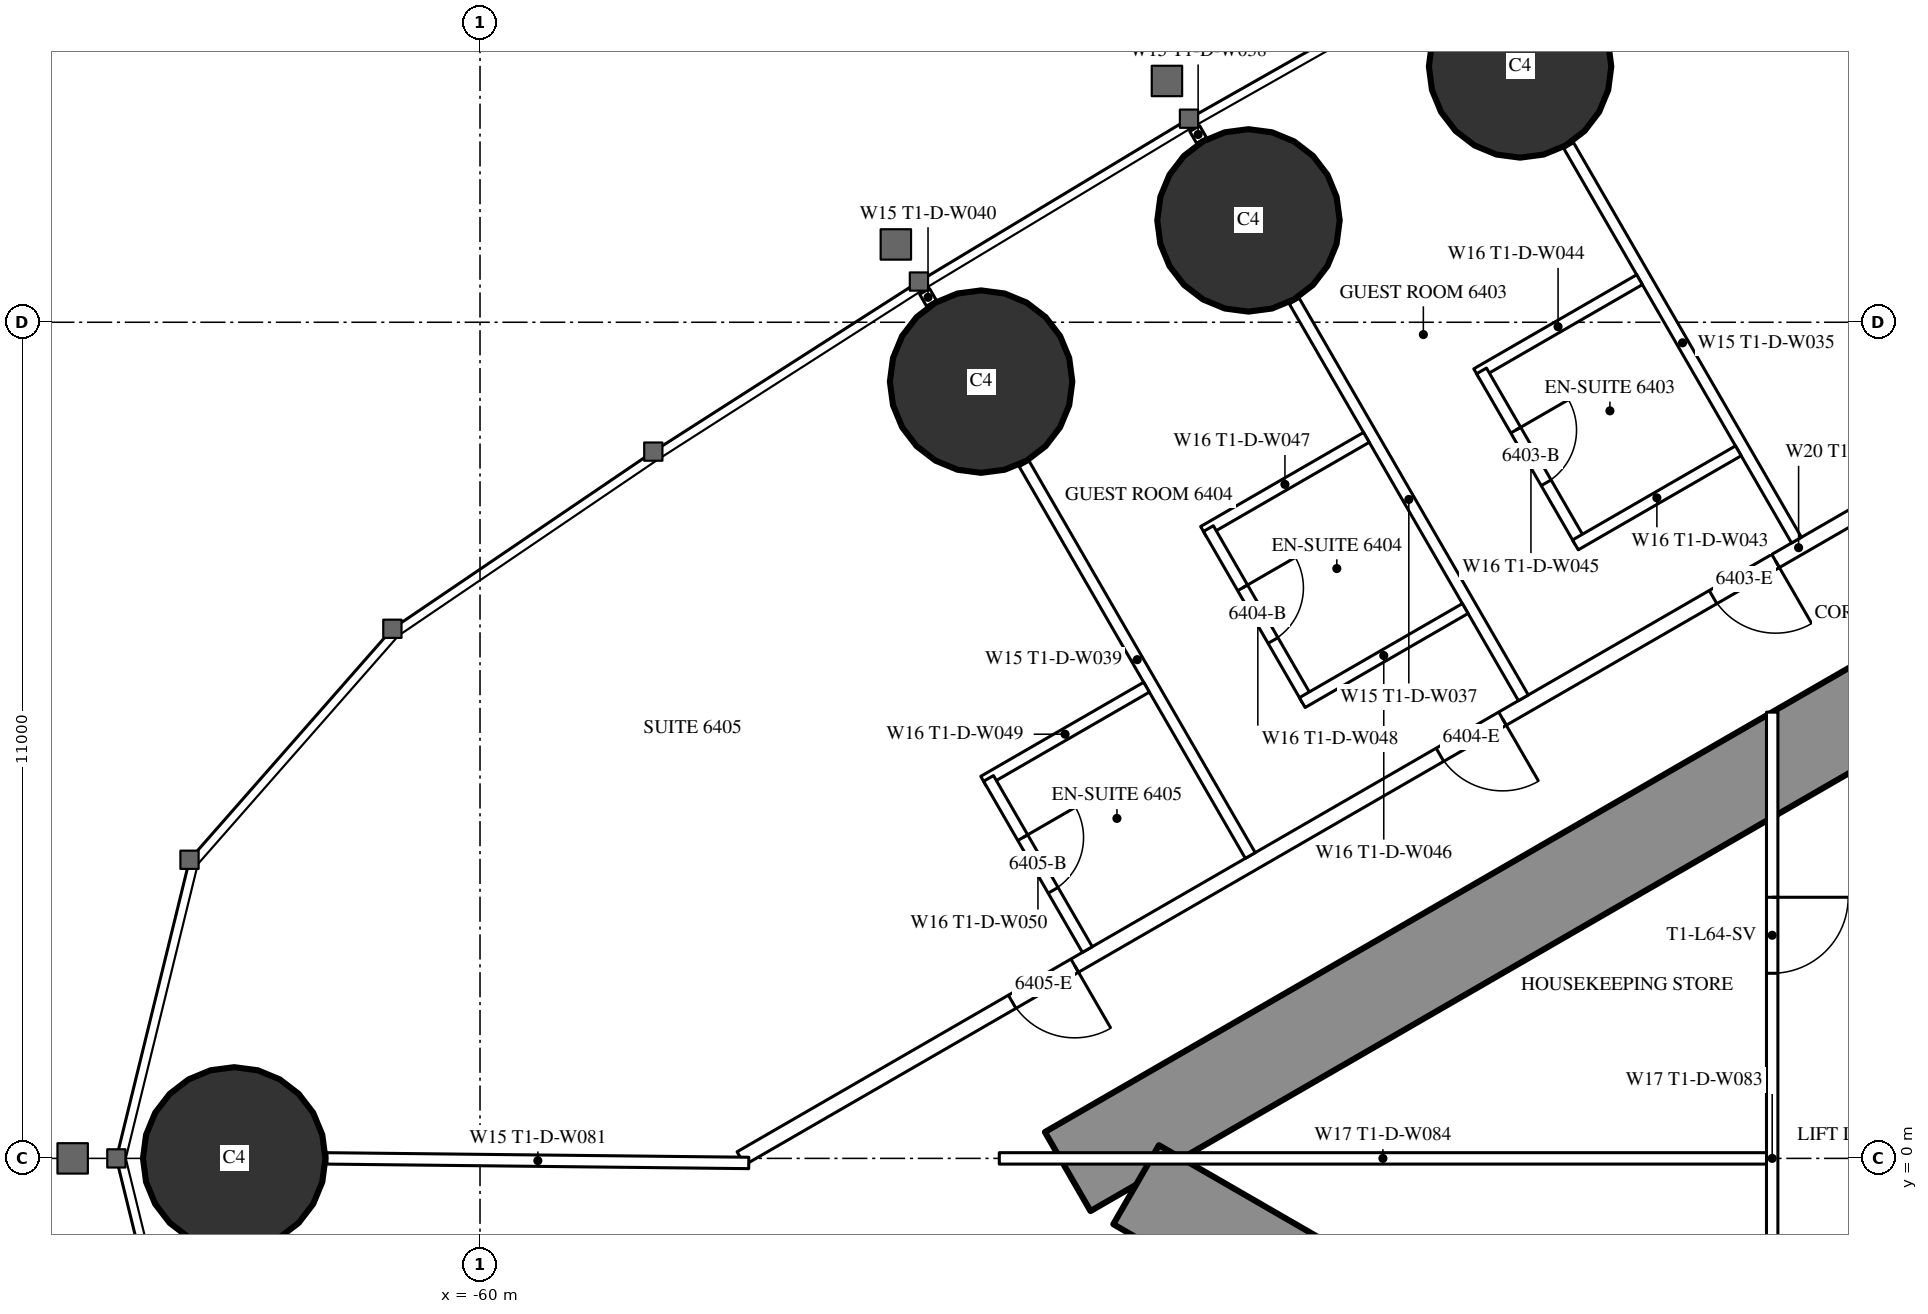
"""IFC4 building model, lengths in metres.
Left out: names, types, materials, properties, quantities, classifications, styles, units other than length and angle.
Written with IfcOpenShell. Run it as: python <this file> out.ifc"""

import sys

from ifc_helpers import new_model, si_unit, direction, frame, frame_2d, origin, origin_2d, place, context, subcontext, project, spatial, rectangle, circle, extrude, element, fill, save


model = new_model("IFC4")
c1 = context("Model", 3, precision=1e-05, world=origin(), true_north=direction((0.0, 1.0)))
c2 = subcontext(c1, "Body", "Model", "MODEL_VIEW")
j1 = project(units=[si_unit("LENGTHUNIT", "METRE"), si_unit("PLANEANGLEUNIT", "RADIAN")], contexts=[c1])
p1 = place(None, origin())
s1 = spatial("IfcSite", under=j1, at=p1, CompositionType="ELEMENT")
p2 = place(p1, origin())
s2 = spatial("IfcBuilding", under=s1, at=p2, CompositionType="ELEMENT")
p3 = place(p2, frame((0.0, 0.0, 240.5)))
s3 = spatial("IfcBuildingStorey", under=s2, at=p3, CompositionType="ELEMENT", Elevation=240.5)
for number, where, z_axis, x_axis in (
    (1, (-63.234, 0.0, 0.0), (0.0, 0.0, 1.0), (1.0, 0.0, 0.0)),
    (2, (-46.317, 14.365, 0.0), (0.0, 0.0, 1.0), (1.0, 0.0, 0.0)),
    (3, (-49.89, 12.34, 0.0), (0.0, 0.0, 1.0), (1.0, 0.0, 0.0)),
    (4, (-53.408, 10.219, 0.0), (0.0, 0.0, 1.0), (1.0, 0.0, 0.0)),
):
    element("IfcColumn", number, at=place(p3, frame(where, z_axis=z_axis, x_axis=x_axis)), inside=s3, PredefinedType="COLUMN", context=c2, shape_type="SweptSolid", body=[
        extrude(circle(Radius=1.2, at=origin_2d()), origin(), (0.0, 0.0, 1.0), 3.6),
    ])
p4 = place(p3, frame((-27.2, 14.3, 0.0), z_axis=(0.0, 0.0, 1.0), x_axis=(-0.866026593062, -0.499997940104, 0.0)))
e5 = element("IfcWall", 5, at=p4, inside=s3, PredefinedType="SHEAR", context=c2, shape_type="SweptSolid", body=[
    extrude(rectangle(XDim=28.946, YDim=1.2, at=frame_2d((14.473, 0.0))), origin(), (0.0, 0.0, 1.0), 3.6),
])
p5 = place(p4, frame((4.6, 0.0, 0.0)))
e6 = element("IfcOpeningElement", 6, at=p5, cuts=e5, PredefinedType="OPENING", context=c2, shape_type="SweptSolid", body=[
    extrude(rectangle(XDim=1.0, YDim=2.2, at=frame_2d((0.5, 1.1))), frame((0.0, 0.61, 0.0), z_axis=(0.0, -1.0, 0.0), x_axis=(1.0, 0.0, 0.0)), (0.0, 0.0, 1.0), 1.22),
])
p6 = place(p4, frame((13.395, 0.0, 0.0)))
e7 = element("IfcOpeningElement", 7, at=p6, cuts=e5, PredefinedType="OPENING", context=c2, shape_type="SweptSolid", body=[
    extrude(rectangle(XDim=1.8, YDim=2.2, at=frame_2d((0.9, 1.1))), frame((0.0, 0.61, 0.0), z_axis=(0.0, -1.0, 0.0), x_axis=(1.0, 0.0, 0.0)), (0.0, 0.0, 1.0), 1.22),
])
p7 = place(p3, frame((-27.2, -14.3, 0.0), z_axis=(0.0, 0.0, 1.0), x_axis=(-0.866024021859, 0.500002393557, 0.0)))
e8 = element("IfcWall", 8, at=p7, inside=s3, PredefinedType="SHEAR", context=c2, shape_type="SweptSolid", body=[
    extrude(rectangle(XDim=27.907, YDim=1.2, at=frame_2d((13.954, 0.0))), origin(), (0.0, 0.0, 1.0), 3.6),
])
p8 = place(p7, frame((4.6, 0.0, 0.0)))
e9 = element("IfcOpeningElement", 9, at=p8, cuts=e8, PredefinedType="OPENING", context=c2, shape_type="SweptSolid", body=[
    extrude(rectangle(XDim=1.0, YDim=2.2, at=frame_2d((0.5, 1.1))), frame((0.0, 0.61, 0.0), z_axis=(0.0, -1.0, 0.0), x_axis=(1.0, 0.0, 0.0)), (0.0, 0.0, 1.0), 1.22),
])
p9 = place(p7, frame((13.395, 0.0, 0.0)))
e10 = element("IfcOpeningElement", 10, at=p9, cuts=e8, PredefinedType="OPENING", context=c2, shape_type="SweptSolid", body=[
    extrude(rectangle(XDim=1.8, YDim=2.2, at=frame_2d((0.9, 1.1))), frame((0.0, 0.61, 0.0), z_axis=(0.0, -1.0, 0.0), x_axis=(1.0, 0.0, 0.0)), (0.0, 0.0, 1.0), 1.22),
])
p10 = place(p3, frame((-28.737, 16.068, 0.0), z_axis=(0.0, 0.0, 1.0), x_axis=(-0.866026057212, -0.499998868229, 0.0)))
e11 = element("IfcWall", 11, at=p10, inside=s3, PredefinedType="PARTITIONING", context=c2, shape_type="SweptSolid", body=[
    extrude(rectangle(XDim=32.137, YDim=0.2, at=frame_2d((16.068, 0.0))), origin(), (0.0, 0.0, 1.0), 3.35),
])
p11 = place(p10, frame((1.08, 0.0, 0.0)))
e12 = element("IfcOpeningElement", 12, at=p11, cuts=e11, PredefinedType="OPENING", context=c2, shape_type="SweptSolid", body=[
    extrude(rectangle(XDim=1.8, YDim=2.03, at=frame_2d((0.9, 1.015))), frame((0.0, 0.11, 0.0), z_axis=(0.0, -1.0, 0.0), x_axis=(1.0, 0.0, 0.0)), (0.0, 0.0, 1.0), 0.22),
])
p12 = place(p10, frame((6.86, 0.0, 0.0)))
e13 = element("IfcOpeningElement", 13, at=p12, cuts=e11, PredefinedType="OPENING", context=c2, shape_type="SweptSolid", body=[
    extrude(rectangle(XDim=1.0, YDim=2.2, at=frame_2d((0.5, 1.1))), frame((0.0, 0.11, 0.0), z_axis=(0.0, -1.0, 0.0), x_axis=(1.0, 0.0, 0.0)), (0.0, 0.0, 1.0), 0.22),
])
p13 = place(p10, frame((16.418, 0.0, 0.0)))
e14 = element("IfcOpeningElement", 14, at=p13, cuts=e11, PredefinedType="OPENING", context=c2, shape_type="SweptSolid", body=[
    extrude(rectangle(XDim=0.95, YDim=2.2, at=frame_2d((0.475, 1.1))), frame((0.0, 0.11, 0.0), z_axis=(0.0, -1.0, 0.0), x_axis=(1.0, 0.0, 0.0)), (0.0, 0.0, 1.0), 0.22),
])
p14 = place(p10, frame((20.567, 0.0, 0.0)))
e15 = element("IfcOpeningElement", 15, at=p14, cuts=e11, PredefinedType="OPENING", context=c2, shape_type="SweptSolid", body=[
    extrude(rectangle(XDim=0.95, YDim=2.2, at=frame_2d((0.475, 1.1))), frame((0.0, 0.11, 0.0), z_axis=(0.0, -1.0, 0.0), x_axis=(1.0, 0.0, 0.0)), (0.0, 0.0, 1.0), 0.22),
])
p15 = place(p10, frame((27.065, 0.0, 0.0)))
e16 = element("IfcOpeningElement", 16, at=p15, cuts=e11, PredefinedType="OPENING", context=c2, shape_type="SweptSolid", body=[
    extrude(rectangle(XDim=0.95, YDim=2.2, at=frame_2d((0.475, 1.1))), frame((0.0, 0.11, 0.0), z_axis=(0.0, -1.0, 0.0), x_axis=(1.0, 0.0, 0.0)), (0.0, 0.0, 1.0), 0.22),
])
p16 = place(p3, frame((-42.68, 8.134, 0.0), z_axis=(0.0, 0.0, 1.0), x_axis=(-0.499984479505, 0.866034364361, 0.0)))
e17 = element("IfcWall", 17, at=p16, inside=s3, PredefinedType="PARTITIONING", context=c2, shape_type="SweptSolid", body=[
    extrude(rectangle(XDim=5.995, YDim=0.15, at=frame_2d((2.998, 0.0))), origin(), (0.0, 0.0, 1.0), 2.45),
])
p17 = place(p3, frame((-46.274, 6.059, 0.0), z_axis=(0.0, 0.0, 1.0), x_axis=(-0.500020471368, 0.866013584312, 0.0)))
e18 = element("IfcWall", 18, at=p17, inside=s3, PredefinedType="PARTITIONING", context=c2, shape_type="SweptSolid", body=[
    extrude(rectangle(XDim=6.028, YDim=0.15, at=frame_2d((3.014, 0.0))), origin(), (0.0, 0.0, 1.0), 2.45),
])
p18 = place(p3, frame((-50.508, 13.392, 0.0), z_axis=(0.0, 0.0, 1.0), x_axis=(-0.499644091975, 0.866230789891, 0.0)))
e19 = element("IfcWall", 19, at=p18, inside=s3, PredefinedType="PARTITIONING", context=c2, shape_type="SweptSolid", body=[
    extrude(rectangle(XDim=0.18, YDim=0.15, at=frame_2d((0.09, 0.0))), origin(), (0.0, 0.0, 1.0), 2.45),
])
p19 = place(p3, frame((-49.866, 3.985, 0.0), z_axis=(0.0, 0.0, 1.0), x_axis=(-0.500000694566, 0.866025002776, 0.0)))
e20 = element("IfcWall", 20, at=p19, inside=s3, PredefinedType="PARTITIONING", context=c2, shape_type="SweptSolid", body=[
    extrude(rectangle(XDim=5.95, YDim=0.15, at=frame_2d((2.975, 0.0))), origin(), (0.0, 0.0, 1.0), 2.45),
])
p20 = place(p3, frame((-54.061, 11.25, 0.0), z_axis=(0.0, 0.0, 1.0), x_axis=(-0.500391173478, 0.865799441849, 0.0)))
e21 = element("IfcWall", 21, at=p20, inside=s3, PredefinedType="PARTITIONING", context=c2, shape_type="SweptSolid", body=[
    extrude(rectangle(XDim=0.179, YDim=0.15, at=frame_2d((0.089, 0.0))), origin(), (0.0, 0.0, 1.0), 2.45),
])
p21 = place(p3, frame((-56.464, -0.06, 0.0), z_axis=(0.0, 0.0, 1.0), x_axis=(-0.999941455167, 0.01082063951, 0.0)))
e22 = element("IfcWall", 22, at=p21, inside=s3, PredefinedType="PARTITIONING", context=c2, shape_type="SweptSolid", body=[
    extrude(rectangle(XDim=5.55, YDim=0.15, at=frame_2d((2.775, 0.0))), origin(), (0.0, 0.0, 1.0), 2.45),
])
p22 = place(p3, frame((-44.745, 11.56, 0.0), z_axis=(0.0, 0.0, 1.0), x_axis=(-0.866006523861, -0.500032699561, 0.0)))
e23 = element("IfcWall", 23, at=p22, inside=s3, PredefinedType="PARTITIONING", context=c2, shape_type="SweptSolid", body=[
    extrude(rectangle(XDim=2.475, YDim=0.15, at=frame_2d((1.237, 0.0))), origin(), (0.0, 0.0, 1.0), 3.35),
])
p23 = place(p3, frame((-45.524, 8.109, 0.0), z_axis=(0.0, 0.0, 1.0), x_axis=(-0.49997716683, 0.86603858612, 0.0)))
e24 = element("IfcWall", 24, at=p23, inside=s3, PredefinedType="PARTITIONING", context=c2, shape_type="SweptSolid", body=[
    extrude(rectangle(XDim=2.6, YDim=0.15, at=frame_2d((1.3, 0.0))), origin(), (0.0, 0.0, 1.0), 3.35),
])
p24 = place(p23, frame((0.9, 0.0, 0.0)))
e25 = element("IfcOpeningElement", 25, at=p24, cuts=e24, PredefinedType="OPENING", context=c2, shape_type="SweptSolid", body=[
    extrude(rectangle(XDim=0.8, YDim=2.2, at=frame_2d((0.4, 1.1))), frame((0.0, 0.085, 0.0), z_axis=(0.0, -1.0, 0.0), x_axis=(1.0, 0.0, 0.0)), (0.0, 0.0, 1.0), 0.17),
])
p25 = place(p3, frame((-43.445, 9.309, 0.0), z_axis=(0.0, 0.0, 1.0), x_axis=(-0.866031185235, -0.4999899861, 0.0)))
e26 = element("IfcWall", 26, at=p25, inside=s3, PredefinedType="PARTITIONING", context=c2, shape_type="SweptSolid", body=[
    extrude(rectangle(XDim=2.475, YDim=0.15, at=frame_2d((1.238, 0.0))), origin(), (0.0, 0.0, 1.0), 3.35),
])
p26 = place(p3, frame((-48.339, 9.486, 0.0), z_axis=(0.0, 0.0, 1.0), x_axis=(-0.866006523861, -0.500032699561, 0.0)))
e27 = element("IfcWall", 27, at=p26, inside=s3, PredefinedType="PARTITIONING", context=c2, shape_type="SweptSolid", body=[
    extrude(rectangle(XDim=2.475, YDim=0.15, at=frame_2d((1.237, 0.0))), origin(), (0.0, 0.0, 1.0), 3.35),
])
p27 = place(p3, frame((-49.117, 6.034, 0.0), z_axis=(0.0, 0.0, 1.0), x_axis=(-0.500006934395, 0.866021400173, 0.0)))
e28 = element("IfcWall", 28, at=p27, inside=s3, PredefinedType="PARTITIONING", context=c2, shape_type="SweptSolid", body=[
    extrude(rectangle(XDim=2.6, YDim=0.15, at=frame_2d((1.3, 0.0))), origin(), (0.0, 0.0, 1.0), 3.35),
])
p28 = place(p27, frame((0.9, 0.0, 0.0)))
e29 = element("IfcOpeningElement", 29, at=p28, cuts=e28, PredefinedType="OPENING", context=c2, shape_type="SweptSolid", body=[
    extrude(rectangle(XDim=0.8, YDim=2.2, at=frame_2d((0.4, 1.1))), frame((0.0, 0.085, 0.0), z_axis=(0.0, -1.0, 0.0), x_axis=(1.0, 0.0, 0.0)), (0.0, 0.0, 1.0), 0.17),
])
for number, where, z_axis, x_axis in (
    (30, (-47.039, 7.234, 0.0), (0.0, 0.0, 1.0), (-0.866, -0.5, 0.0)),
    (31, (-51.231, 6.199, 0.0), (0.0, 0.0, 1.0), (-0.866, -0.5, 0.0)),
):
    element("IfcWall", number, at=place(p3, frame(where, z_axis=z_axis, x_axis=x_axis)), inside=s3, PredefinedType="PARTITIONING", context=c2, shape_type="SweptSolid", body=[
        extrude(rectangle(XDim=2.475, YDim=0.15, at=frame_2d((1.238, 0.0))), origin(), (0.0, 0.0, 1.0), 3.35),
    ])
p29 = place(p3, frame((-52.01, 2.747, 0.0), z_axis=(0.0, 0.0, 1.0), x_axis=(-0.500006934395, 0.866021400173, 0.0)))
e32 = element("IfcWall", 32, at=p29, inside=s3, PredefinedType="PARTITIONING", context=c2, shape_type="SweptSolid", body=[
    extrude(rectangle(XDim=2.6, YDim=0.15, at=frame_2d((1.3, 0.0))), origin(), (0.0, 0.0, 1.0), 3.35),
])
p30 = place(p29, frame((0.9, 0.0, 0.0)))
e33 = element("IfcOpeningElement", 33, at=p30, cuts=e32, PredefinedType="OPENING", context=c2, shape_type="SweptSolid", body=[
    extrude(rectangle(XDim=0.8, YDim=2.2, at=frame_2d((0.4, 1.1))), frame((0.0, 0.085, 0.0), z_axis=(0.0, -1.0, 0.0), x_axis=(1.0, 0.0, 0.0)), (0.0, 0.0, 1.0), 0.17),
])
p31 = place(p3, frame((-43.0, 5.871, 0.0), z_axis=(0.0, 0.0, 1.0), x_axis=(0.0, -1.0, 0.0)))
e34 = element("IfcWall", 34, at=p31, inside=s3, PredefinedType="PARTITIONING", context=c2, shape_type="SweptSolid", body=[
    extrude(rectangle(XDim=11.741, YDim=0.15, at=frame_2d((5.871, 0.0))), origin(), (0.0, 0.0, 1.0), 3.35),
])
p32 = place(p31, frame((2.435, 0.0, 0.0)))
e35 = element("IfcOpeningElement", 35, at=p32, cuts=e34, PredefinedType="OPENING", context=c2, shape_type="SweptSolid", body=[
    extrude(rectangle(XDim=1.0, YDim=2.2, at=frame_2d((0.5, 1.1))), frame((0.0, 0.085, 0.0), z_axis=(0.0, -1.0, 0.0), x_axis=(1.0, 0.0, 0.0)), (0.0, 0.0, 1.0), 0.17),
])
p33 = place(p31, frame((8.306, 0.0, 0.0)))
e36 = element("IfcOpeningElement", 36, at=p33, cuts=e34, PredefinedType="OPENING", context=c2, shape_type="SweptSolid", body=[
    extrude(rectangle(XDim=1.0, YDim=2.2, at=frame_2d((0.5, 1.1))), frame((0.0, 0.085, 0.0), z_axis=(0.0, -1.0, 0.0), x_axis=(1.0, 0.0, 0.0)), (0.0, 0.0, 1.0), 0.17),
])
p34 = place(p3, frame((-43.075, 0.0, 0.0), z_axis=(0.0, 0.0, 1.0), x_axis=(-1.0, 0.0, 0.0)))
e37 = element("IfcWall", 37, at=p34, inside=s3, PredefinedType="PARTITIONING", context=c2, shape_type="SweptSolid", body=[
    extrude(rectangle(XDim=10.093, YDim=0.15, at=frame_2d((5.047, 0.0))), origin(), (0.0, 0.0, 1.0), 2.45),
])
p35 = place(p24, origin())
e38 = element("IfcDoor", 38, at=p35, inside=s3, OperationType="SINGLE_SWING_RIGHT", PredefinedType="DOOR", context=c2, shape_type="SweptSolid", body=[
    extrude(rectangle(XDim=0.8, YDim=2.2, at=frame_2d((0.4, 1.1))), frame((0.0, 0.025, 0.0), z_axis=(0.0, -1.0, 0.0), x_axis=(1.0, 0.0, 0.0)), (0.0, 0.0, 1.0), 0.05),
])
fill(e25, e38)
p36 = place(p13, origin())
e39 = element("IfcDoor", 39, at=p36, inside=s3, OperationType="SINGLE_SWING_LEFT", PredefinedType="DOOR", context=c2, shape_type="SweptSolid", body=[
    extrude(rectangle(XDim=0.95, YDim=2.2, at=frame_2d((0.475, 1.1))), frame((0.0, 0.025, 0.0), z_axis=(0.0, -1.0, 0.0), x_axis=(1.0, 0.0, 0.0)), (0.0, 0.0, 1.0), 0.05),
])
fill(e14, e39)
p37 = place(p28, origin())
e40 = element("IfcDoor", 40, at=p37, inside=s3, OperationType="SINGLE_SWING_RIGHT", PredefinedType="DOOR", context=c2, shape_type="SweptSolid", body=[
    extrude(rectangle(XDim=0.8, YDim=2.2, at=frame_2d((0.4, 1.1))), frame((0.0, 0.025, 0.0), z_axis=(0.0, -1.0, 0.0), x_axis=(1.0, 0.0, 0.0)), (0.0, 0.0, 1.0), 0.05),
])
fill(e29, e40)
p38 = place(p14, origin())
e41 = element("IfcDoor", 41, at=p38, inside=s3, OperationType="SINGLE_SWING_LEFT", PredefinedType="DOOR", context=c2, shape_type="SweptSolid", body=[
    extrude(rectangle(XDim=0.95, YDim=2.2, at=frame_2d((0.475, 1.1))), frame((0.0, 0.025, 0.0), z_axis=(0.0, -1.0, 0.0), x_axis=(1.0, 0.0, 0.0)), (0.0, 0.0, 1.0), 0.05),
])
fill(e15, e41)
p39 = place(p30, origin())
e42 = element("IfcDoor", 42, at=p39, inside=s3, OperationType="SINGLE_SWING_RIGHT", PredefinedType="DOOR", context=c2, shape_type="SweptSolid", body=[
    extrude(rectangle(XDim=0.8, YDim=2.2, at=frame_2d((0.4, 1.1))), frame((0.0, 0.025, 0.0), z_axis=(0.0, -1.0, 0.0), x_axis=(1.0, 0.0, 0.0)), (0.0, 0.0, 1.0), 0.05),
])
fill(e33, e42)
p40 = place(p15, origin())
e43 = element("IfcDoor", 43, at=p40, inside=s3, OperationType="SINGLE_SWING_LEFT", PredefinedType="DOOR", context=c2, shape_type="SweptSolid", body=[
    extrude(rectangle(XDim=0.95, YDim=2.2, at=frame_2d((0.475, 1.1))), frame((0.0, 0.025, 0.0), z_axis=(0.0, -1.0, 0.0), x_axis=(1.0, 0.0, 0.0)), (0.0, 0.0, 1.0), 0.05),
])
fill(e16, e43)
p41 = place(p32, origin())
e44 = element("IfcDoor", 44, at=p41, inside=s3, OperationType="SINGLE_SWING_LEFT", PredefinedType="DOOR", context=c2, shape_type="SweptSolid", body=[
    extrude(rectangle(XDim=1.0, YDim=2.2, at=frame_2d((0.5, 1.1))), frame((0.0, 0.025, 0.0), z_axis=(0.0, -1.0, 0.0), x_axis=(1.0, 0.0, 0.0)), (0.0, 0.0, 1.0), 0.05),
])
fill(e35, e44)
save(model, sys.argv[1])
